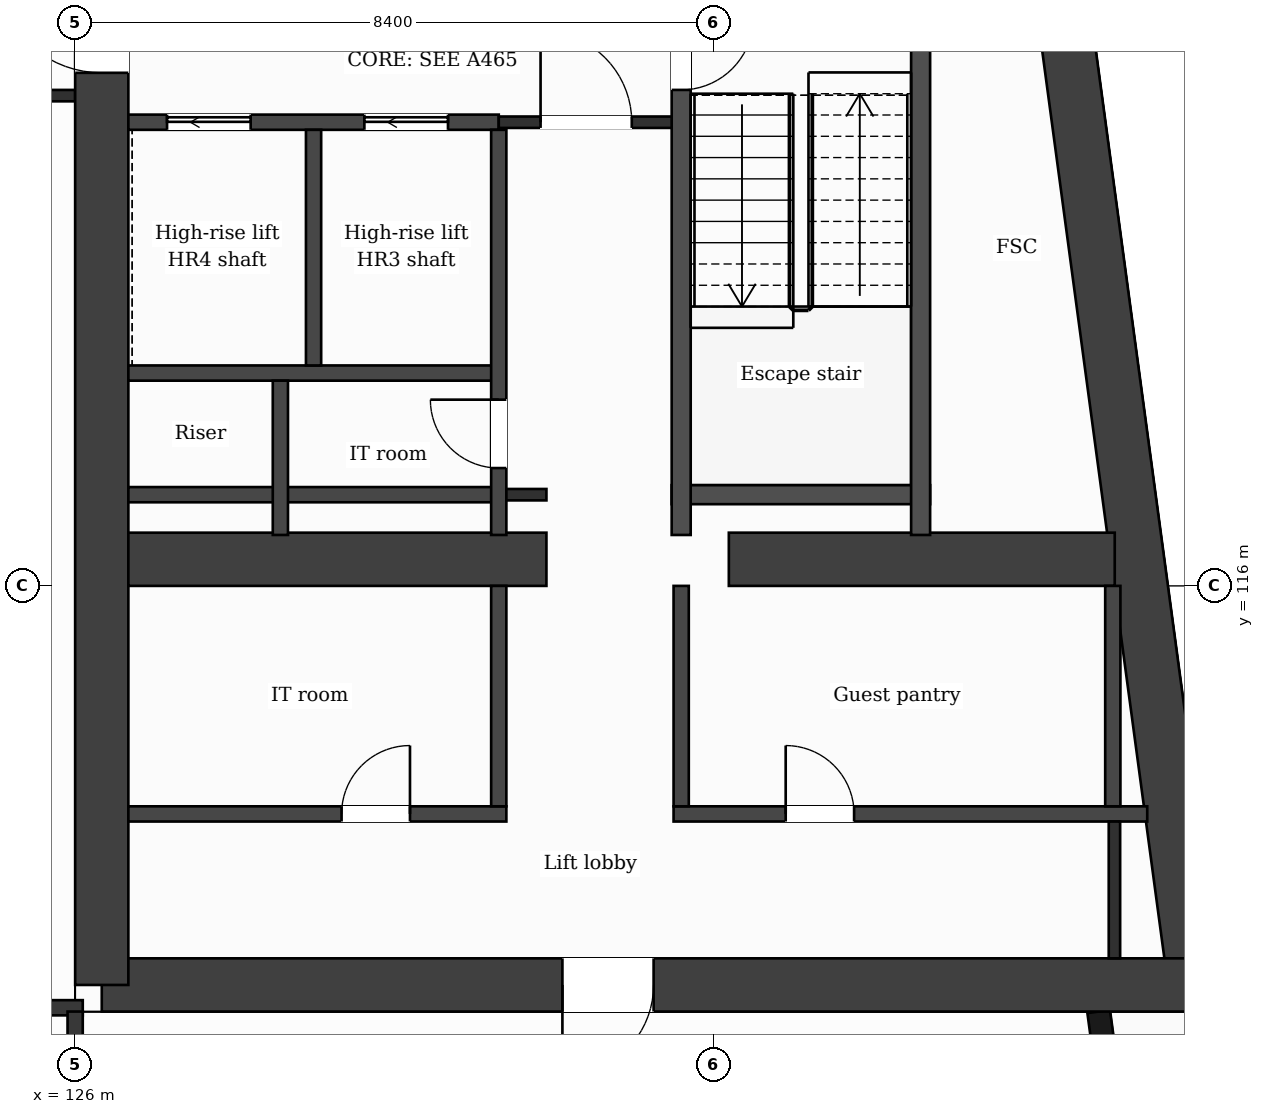
"""IFC4 building model, lengths in metres.
Left out: names, types, materials, properties, quantities, classifications, styles, units other than length and angle.
Written with IfcOpenShell. Run it as: python <this file> out.ifc"""

import sys

from ifc_helpers import new_model, si_unit, direction, frame, frame_2d, origin, place, context, subcontext, project, spatial, rectangle, extrude, element, fill, save


model = new_model("IFC4")
c1 = context("Model", 3, precision=1e-05, world=origin(), true_north=direction((0.0, 1.0)))
c2 = subcontext(c1, "Body", "Model", "MODEL_VIEW")
j1 = project(units=[si_unit("LENGTHUNIT", "METRE"), si_unit("PLANEANGLEUNIT", "RADIAN")], contexts=[c1])
p1 = place(None, origin())
s1 = spatial("IfcSite", under=j1, at=p1, CompositionType="ELEMENT")
p2 = place(p1, origin())
s2 = spatial("IfcBuilding", under=s1, at=p2, CompositionType="ELEMENT")
p3 = place(p2, frame((0.0, 0.0, 266.4)))
s3 = spatial("IfcBuildingStorey", under=s2, at=p3, CompositionType="ELEMENT", Elevation=266.4)
p4 = place(p3, frame((137.863, 132.05, 0.0), z_axis=(0.0, 0.0, 1.0), x_axis=(0.133406218907, -0.991061441464, 0.0)))
e1 = element("IfcWall", 1, at=p4, inside=s3, PredefinedType="SHEAR", context=c2, shape_type="SweptSolid", body=[
    extrude(rectangle(XDim=21.492, YDim=0.7, at=frame_2d((10.746, 0.0))), origin(), (0.0, 0.0, 1.0), 3.7),
])
p5 = place(p3, frame((140.73, 110.75, 0.0), z_axis=(0.0, 0.0, 1.0), x_axis=(-1.0, 0.0, 0.0)))
e2 = element("IfcWall", 2, at=p5, inside=s3, PredefinedType="SHEAR", context=c2, shape_type="SweptSolid", body=[
    extrude(rectangle(XDim=14.38, YDim=0.7, at=frame_2d((7.19, 0.0))), origin(), (0.0, 0.0, 1.0), 3.7),
])
p6 = place(p5, frame((7.12, 0.0, 0.0)))
e3 = element("IfcOpeningElement", 3, at=p6, cuts=e2, PredefinedType="OPENING", context=c2, shape_type="SweptSolid", body=[
    extrude(rectangle(XDim=1.2, YDim=2.1, at=frame_2d((0.6, 1.05))), frame((0.0, 0.36, 0.0), z_axis=(0.0, -1.0, 0.0), x_axis=(1.0, 0.0, 0.0)), (0.0, 0.0, 1.0), 0.72),
])
p7 = place(p3, frame((126.35, 110.75, 0.0), z_axis=(0.0, 0.0, 1.0), x_axis=(0.0, 1.0, 0.0)))
e4 = element("IfcWall", 4, at=p7, inside=s3, PredefinedType="SHEAR", context=c2, shape_type="SweptSolid", body=[
    extrude(rectangle(XDim=21.3, YDim=0.7, at=frame_2d((10.65, 0.0))), origin(), (0.0, 0.0, 1.0), 3.7),
])
p8 = place(p7, frame((12.0, 0.0, 0.0)))
e5 = element("IfcOpeningElement", 5, at=p8, cuts=e4, PredefinedType="OPENING", context=c2, shape_type="SweptSolid", body=[
    extrude(rectangle(XDim=1.4, YDim=2.1, at=frame_2d((0.7, 1.05))), frame((0.0, 0.36, 0.0), z_axis=(0.0, -1.0, 0.0), x_axis=(1.0, 0.0, 0.0)), (0.0, 0.0, 1.0), 0.72),
])
p9 = place(p3, frame((126.7, 116.35, 0.0), z_axis=(0.0, 0.0, 1.0), x_axis=(1.0, 0.0, 0.0)))
e6 = element("IfcWall", 6, at=p9, inside=s3, PredefinedType="SHEAR", context=c2, shape_type="SweptSolid", body=[
    extrude(rectangle(XDim=5.5, YDim=0.7, at=frame_2d((2.75, 0.0))), origin(), (0.0, 0.0, 1.0), 3.7),
])
p10 = place(p3, frame((134.6, 116.35, 0.0), z_axis=(0.0, 0.0, 1.0), x_axis=(1.0, 0.0, 0.0)))
e7 = element("IfcWall", 7, at=p10, inside=s3, PredefinedType="SHEAR", context=c2, shape_type="SweptSolid", body=[
    extrude(rectangle(XDim=5.077, YDim=0.7, at=frame_2d((2.539, 0.0))), origin(), (0.0, 0.0, 1.0), 3.7),
])
p11 = place(p3, frame((139.701, 108.65, 0.0), z_axis=(0.0, 0.0, 1.0), x_axis=(-0.133422458344, 0.991059255347, 0.0)))
e8 = element("IfcWall", 8, at=p11, inside=s3, PredefinedType="SOLIDWALL", context=c2, shape_type="SweptSolid", body=[
    extrude(rectangle(XDim=1.766, YDim=0.3, at=frame_2d((0.883, 0.0))), origin(), (0.0, 0.0, 1.0), 3.38),
])
p12 = place(p3, frame((100.7, 110.45, 0.0), z_axis=(0.0, 0.0, 1.0), x_axis=(1.0, 0.0, 0.0)))
e9 = element("IfcWall", 9, at=p12, inside=s3, PredefinedType="PARTITIONING", context=c2, shape_type="SweptSolid", body=[
    extrude(rectangle(XDim=25.4, YDim=0.2, at=frame_2d((12.7, 0.0))), origin(), (0.0, 0.0, 1.0), 3.38),
])
p13 = place(p3, frame((126.7, 113.0, 0.0), z_axis=(0.0, 0.0, 1.0), x_axis=(1.0, 0.0, 0.0)))
e10 = element("IfcWall", 10, at=p13, inside=s3, PredefinedType="PARTITIONING", context=c2, shape_type="SweptSolid", body=[
    extrude(rectangle(XDim=4.973, YDim=0.2, at=frame_2d((2.487, 0.0))), origin(), (0.0, 0.0, 1.0), 3.38),
])
p14 = place(p13, frame((2.805, 0.0, 0.0)))
e11 = element("IfcOpeningElement", 11, at=p14, cuts=e10, PredefinedType="OPENING", context=c2, shape_type="SweptSolid", body=[
    extrude(rectangle(XDim=0.9, YDim=2.1, at=frame_2d((0.45, 1.05))), frame((0.0, 0.11, 0.0), z_axis=(0.0, -1.0, 0.0), x_axis=(1.0, 0.0, 0.0)), (0.0, 0.0, 1.0), 0.22),
])
p15 = place(p3, frame((133.873, 113.0, 0.0), z_axis=(0.0, 0.0, 1.0), x_axis=(1.0, 0.0, 0.0)))
e12 = element("IfcWall", 12, at=p15, inside=s3, PredefinedType="PARTITIONING", context=c2, shape_type="SweptSolid", body=[
    extrude(rectangle(XDim=6.231, YDim=0.2, at=frame_2d((3.116, 0.0))), origin(), (0.0, 0.0, 1.0), 3.38),
])
p16 = place(p15, frame((1.475, 0.0, 0.0)))
e13 = element("IfcOpeningElement", 13, at=p16, cuts=e12, PredefinedType="OPENING", context=c2, shape_type="SweptSolid", body=[
    extrude(rectangle(XDim=0.9, YDim=2.1, at=frame_2d((0.45, 1.05))), frame((0.0, 0.11, 0.0), z_axis=(0.0, -1.0, 0.0), x_axis=(1.0, 0.0, 0.0)), (0.0, 0.0, 1.0), 0.22),
])
p17 = place(p3, frame((126.7, 117.2, 0.0), z_axis=(0.0, 0.0, 1.0), x_axis=(1.0, 0.0, 0.0)))
e14 = element("IfcWall", 14, at=p17, inside=s3, PredefinedType="PARTITIONING", context=c2, shape_type="SweptSolid", body=[
    extrude(rectangle(XDim=4.873, YDim=0.2, at=frame_2d((2.437, 0.0))), origin(), (0.0, 0.0, 1.0), 3.38),
])
p18 = place(p3, frame((131.573, 117.2, 0.0), z_axis=(0.0, 0.0, 1.0), x_axis=(1.0, 0.0, 0.0)))
e15 = element("IfcWall", 15, at=p18, inside=s3, PredefinedType="PARTITIONING", context=c2, shape_type="SweptSolid", body=[
    extrude(rectangle(XDim=0.627, YDim=0.15, at=frame_2d((0.313, 0.0))), origin(), (0.0, 0.0, 1.0), 3.38),
])
p19 = place(p3, frame((133.848, 117.2, 0.0), z_axis=(0.0, 0.0, 1.0), x_axis=(1.0, 0.0, 0.0)))
e16 = element("IfcWall", 16, at=p19, inside=s3, PredefinedType="PARTITIONING", context=c2, shape_type="SweptSolid", body=[
    extrude(rectangle(XDim=3.4, YDim=0.25, at=frame_2d((1.7, 0.0))), origin(), (0.0, 0.0, 1.0), 3.38),
])
p20 = place(p3, frame((126.7, 118.8, 0.0), z_axis=(0.0, 0.0, 1.0), x_axis=(1.0, 0.0, 0.0)))
e17 = element("IfcWall", 17, at=p20, inside=s3, PredefinedType="PARTITIONING", context=c2, shape_type="SweptSolid", body=[
    extrude(rectangle(XDim=4.873, YDim=0.2, at=frame_2d((2.437, 0.0))), origin(), (0.0, 0.0, 1.0), 3.38),
])
p21 = place(p3, frame((126.7, 122.1, 0.0), z_axis=(0.0, 0.0, 1.0), x_axis=(1.0, 0.0, 0.0)))
e18 = element("IfcWall", 18, at=p21, inside=s3, PredefinedType="PARTITIONING", context=c2, shape_type="SweptSolid", body=[
    extrude(rectangle(XDim=4.873, YDim=0.2, at=frame_2d((2.437, 0.0))), origin(), (0.0, 0.0, 1.0), 3.38),
])
p22 = place(p21, frame((3.105, 0.0, 0.0)))
e19 = element("IfcOpeningElement", 19, at=p22, cuts=e18, PredefinedType="OPENING", context=c2, shape_type="SweptSolid", body=[
    extrude(rectangle(XDim=1.1, YDim=2.1, at=frame_2d((0.55, 1.05))), frame((0.0, 0.11, 0.0), z_axis=(0.0, -1.0, 0.0), x_axis=(1.0, 0.0, 0.0)), (0.0, 0.0, 1.0), 0.22),
])
p23 = place(p21, frame((0.509, 0.0, 0.0)))
e20 = element("IfcOpeningElement", 20, at=p23, cuts=e18, PredefinedType="OPENING", context=c2, shape_type="SweptSolid", body=[
    extrude(rectangle(XDim=1.1, YDim=2.1, at=frame_2d((0.55, 1.05))), frame((0.0, 0.11, 0.0), z_axis=(0.0, -1.0, 0.0), x_axis=(1.0, 0.0, 0.0)), (0.0, 0.0, 1.0), 0.22),
])
p24 = place(p3, frame((131.573, 122.1, 0.0), z_axis=(0.0, 0.0, 1.0), x_axis=(1.0, 0.0, 0.0)))
e21 = element("IfcWall", 21, at=p24, inside=s3, PredefinedType="PARTITIONING", context=c2, shape_type="SweptSolid", body=[
    extrude(rectangle(XDim=2.4, YDim=0.15, at=frame_2d((1.2, 0.0))), origin(), (0.0, 0.0, 1.0), 3.38),
])
p25 = place(p24, frame((0.55, 0.0, 0.0)))
e22 = element("IfcOpeningElement", 22, at=p25, cuts=e21, PredefinedType="OPENING", context=c2, shape_type="SweptSolid", body=[
    extrude(rectangle(XDim=1.2, YDim=2.1, at=frame_2d((0.6, 1.05))), frame((0.0, 0.085, 0.0), z_axis=(0.0, -1.0, 0.0), x_axis=(1.0, 0.0, 0.0)), (0.0, 0.0, 1.0), 0.17),
])
p26 = place(p3, frame((100.8, 122.45, 0.0), z_axis=(0.0, 0.0, 1.0), x_axis=(1.0, 0.0, 0.0)))
e23 = element("IfcWall", 23, at=p26, inside=s3, PredefinedType="PARTITIONING", context=c2, shape_type="SweptSolid", body=[
    extrude(rectangle(XDim=25.2, YDim=0.15, at=frame_2d((12.6, 0.0))), origin(), (0.0, 0.0, 1.0), 3.38),
])
p27 = place(p26, frame((5.55, 0.0, 0.0)))
e24 = element("IfcOpeningElement", 24, at=p27, cuts=e23, PredefinedType="OPENING", context=c2, shape_type="SweptSolid", body=[
    extrude(rectangle(XDim=1.0, YDim=2.1, at=frame_2d((0.5, 1.05))), frame((0.0, 0.085, 0.0), z_axis=(0.0, -1.0, 0.0), x_axis=(1.0, 0.0, 0.0)), (0.0, 0.0, 1.0), 0.17),
])
p28 = place(p26, frame((8.65, 0.0, 0.0)))
e25 = element("IfcOpeningElement", 25, at=p28, cuts=e23, PredefinedType="OPENING", context=c2, shape_type="SweptSolid", body=[
    extrude(rectangle(XDim=1.0, YDim=2.1, at=frame_2d((0.5, 1.05))), frame((0.0, 0.085, 0.0), z_axis=(0.0, -1.0, 0.0), x_axis=(1.0, 0.0, 0.0)), (0.0, 0.0, 1.0), 0.17),
])
p29 = place(p26, frame((19.83, 0.0, 0.0)))
e26 = element("IfcOpeningElement", 26, at=p29, cuts=e23, PredefinedType="OPENING", context=c2, shape_type="SweptSolid", body=[
    extrude(rectangle(XDim=1.0, YDim=2.1, at=frame_2d((0.5, 1.05))), frame((0.0, 0.085, 0.0), z_axis=(0.0, -1.0, 0.0), x_axis=(1.0, 0.0, 0.0)), (0.0, 0.0, 1.0), 0.17),
])
p30 = place(p3, frame((126.0, 108.79, 0.0), z_axis=(0.0, 0.0, 1.0), x_axis=(0.0, 1.0, 0.0)))
e27 = element("IfcWall", 27, at=p30, inside=s3, PredefinedType="PARTITIONING", context=c2, shape_type="SweptSolid", body=[
    extrude(rectangle(XDim=1.61, YDim=0.2, at=frame_2d((0.805, 0.0))), origin(), (0.0, 0.0, 1.0), 3.38),
])
p31 = place(p3, frame((128.7, 116.67, 0.0), z_axis=(0.0, 0.0, 1.0), x_axis=(0.0, 1.0, 0.0)))
e28 = element("IfcWall", 28, at=p31, inside=s3, PredefinedType="PARTITIONING", context=c2, shape_type="SweptSolid", body=[
    extrude(rectangle(XDim=2.03, YDim=0.2, at=frame_2d((1.015, 0.0))), origin(), (0.0, 0.0, 1.0), 3.38),
])
p32 = place(p3, frame((129.136, 118.9, 0.0), z_axis=(0.0, 0.0, 1.0), x_axis=(0.0, 1.0, 0.0)))
e29 = element("IfcWall", 29, at=p32, inside=s3, PredefinedType="PARTITIONING", context=c2, shape_type="SweptSolid", body=[
    extrude(rectangle(XDim=3.1, YDim=0.2, at=frame_2d((1.55, 0.0))), origin(), (0.0, 0.0, 1.0), 3.38),
])
p33 = place(p3, frame((131.573, 113.1, 0.0), z_axis=(0.0, 0.0, 1.0), x_axis=(0.0, 1.0, 0.0)))
e30 = element("IfcWall", 30, at=p33, inside=s3, PredefinedType="PARTITIONING", context=c2, shape_type="SweptSolid", body=[
    extrude(rectangle(XDim=2.9, YDim=0.2, at=frame_2d((1.45, 0.0))), origin(), (0.0, 0.0, 1.0), 3.38),
])
p34 = place(p3, frame((131.573, 116.67, 0.0), z_axis=(0.0, 0.0, 1.0), x_axis=(0.0, 1.0, 0.0)))
e31 = element("IfcWall", 31, at=p34, inside=s3, PredefinedType="PARTITIONING", context=c2, shape_type="SweptSolid", body=[
    extrude(rectangle(XDim=5.33, YDim=0.2, at=frame_2d((2.665, 0.0))), origin(), (0.0, 0.0, 1.0), 3.38),
])
p35 = place(p34, frame((0.88, 0.0, 0.0)))
e32 = element("IfcOpeningElement", 32, at=p35, cuts=e31, PredefinedType="OPENING", context=c2, shape_type="SweptSolid", body=[
    extrude(rectangle(XDim=0.9, YDim=2.1, at=frame_2d((0.45, 1.05))), frame((0.0, 0.11, 0.0), z_axis=(0.0, -1.0, 0.0), x_axis=(1.0, 0.0, 0.0)), (0.0, 0.0, 1.0), 0.22),
])
p36 = place(p3, frame((133.973, 113.1, 0.0), z_axis=(0.0, 0.0, 1.0), x_axis=(0.0, 1.0, 0.0)))
e33 = element("IfcWall", 33, at=p36, inside=s3, PredefinedType="PARTITIONING", context=c2, shape_type="SweptSolid", body=[
    extrude(rectangle(XDim=2.9, YDim=0.2, at=frame_2d((1.45, 0.0))), origin(), (0.0, 0.0, 1.0), 3.38),
])
p37 = place(p3, frame((133.973, 116.67, 0.0), z_axis=(0.0, 0.0, 1.0), x_axis=(0.0, 1.0, 0.0)))
e34 = element("IfcWall", 34, at=p37, inside=s3, PredefinedType="PARTITIONING", context=c2, shape_type="SweptSolid", body=[
    extrude(rectangle(XDim=7.155, YDim=0.25, at=frame_2d((3.578, 0.0))), origin(), (0.0, 0.0, 1.0), 3.38),
])
p38 = place(p37, frame((5.855, 0.0, 0.0)))
e35 = element("IfcOpeningElement", 35, at=p38, cuts=e34, PredefinedType="OPENING", context=c2, shape_type="SweptSolid", body=[
    extrude(rectangle(XDim=0.95, YDim=2.1, at=frame_2d((0.475, 1.05))), frame((0.0, 0.135, 0.0), z_axis=(0.0, -1.0, 0.0), x_axis=(1.0, 0.0, 0.0)), (0.0, 0.0, 1.0), 0.27),
])
p39 = place(p3, frame((137.123, 116.67, 0.0), z_axis=(0.0, 0.0, 1.0), x_axis=(0.0, 1.0, 0.0)))
e36 = element("IfcWall", 36, at=p39, inside=s3, PredefinedType="PARTITIONING", context=c2, shape_type="SweptSolid", body=[
    extrude(rectangle(XDim=7.155, YDim=0.25, at=frame_2d((3.578, 0.0))), origin(), (0.0, 0.0, 1.0), 3.38),
])
p40 = place(p3, frame((139.652, 113.1, 0.0), z_axis=(0.0, 0.0, 1.0), x_axis=(0.0, 1.0, 0.0)))
e37 = element("IfcWall", 37, at=p40, inside=s3, PredefinedType="PARTITIONING", context=c2, shape_type="SweptSolid", body=[
    extrude(rectangle(XDim=2.9, YDim=0.2, at=frame_2d((1.45, 0.0))), origin(), (0.0, 0.0, 1.0), 3.38),
])
p41 = place(p3, frame((139.673, 111.1, 0.0), z_axis=(0.0, 0.0, 1.0), x_axis=(0.0, 1.0, 0.0)))
e38 = element("IfcWall", 38, at=p41, inside=s3, PredefinedType="PARTITIONING", context=c2, shape_type="SweptSolid", body=[
    extrude(rectangle(XDim=1.8, YDim=0.15, at=frame_2d((0.9, 0.0))), origin(), (0.0, 0.0, 1.0), 3.38),
])
p42 = place(p25, origin())
e39 = element("IfcDoor", 39, at=p42, inside=s3, OperationType="SINGLE_SWING_LEFT", PredefinedType="DOOR", context=c2, shape_type="SweptSolid", body=[
    extrude(rectangle(XDim=1.2, YDim=2.1, at=frame_2d((0.6, 1.05))), frame((0.0, 0.025, 0.0), z_axis=(0.0, -1.0, 0.0), x_axis=(1.0, 0.0, 0.0)), (0.0, 0.0, 1.0), 0.05),
])
fill(e22, e39)
p43 = place(p22, origin())
e40 = element("IfcDoor", 40, at=p43, inside=s3, OperationType="SLIDING_TO_LEFT", PredefinedType="DOOR", context=c2, shape_type="SweptSolid", body=[
    extrude(rectangle(XDim=1.1, YDim=2.1, at=frame_2d((0.55, 1.05))), frame((0.0, 0.025, 0.0), z_axis=(0.0, -1.0, 0.0), x_axis=(1.0, 0.0, 0.0)), (0.0, 0.0, 1.0), 0.05),
])
fill(e19, e40)
p44 = place(p23, origin())
e41 = element("IfcDoor", 41, at=p44, inside=s3, OperationType="SLIDING_TO_LEFT", PredefinedType="DOOR", context=c2, shape_type="SweptSolid", body=[
    extrude(rectangle(XDim=1.1, YDim=2.1, at=frame_2d((0.55, 1.05))), frame((0.0, 0.025, 0.0), z_axis=(0.0, -1.0, 0.0), x_axis=(1.0, 0.0, 0.0)), (0.0, 0.0, 1.0), 0.05),
])
fill(e20, e41)
p45 = place(p38, origin())
e42 = element("IfcDoor", 42, at=p45, inside=s3, OperationType="SINGLE_SWING_RIGHT", PredefinedType="DOOR", context=c2, shape_type="SweptSolid", body=[
    extrude(rectangle(XDim=0.95, YDim=2.1, at=frame_2d((0.475, 1.05))), frame((0.0, 0.025, 0.0), z_axis=(0.0, -1.0, 0.0), x_axis=(1.0, 0.0, 0.0)), (0.0, 0.0, 1.0), 0.05),
])
fill(e35, e42)
p46 = place(p35, origin())
e43 = element("IfcDoor", 43, at=p46, inside=s3, OperationType="SINGLE_SWING_RIGHT", PredefinedType="DOOR", context=c2, shape_type="SweptSolid", body=[
    extrude(rectangle(XDim=0.9, YDim=2.1, at=frame_2d((0.45, 1.05))), frame((0.0, 0.025, 0.0), z_axis=(0.0, -1.0, 0.0), x_axis=(1.0, 0.0, 0.0)), (0.0, 0.0, 1.0), 0.05),
])
fill(e32, e43)
p47 = place(p16, origin())
e44 = element("IfcDoor", 44, at=p47, inside=s3, OperationType="SINGLE_SWING_LEFT", PredefinedType="DOOR", context=c2, shape_type="SweptSolid", body=[
    extrude(rectangle(XDim=0.9, YDim=2.1, at=frame_2d((0.45, 1.05))), frame((0.0, 0.025, 0.0), z_axis=(0.0, -1.0, 0.0), x_axis=(1.0, 0.0, 0.0)), (0.0, 0.0, 1.0), 0.05),
])
fill(e13, e44)
p48 = place(p14, origin())
e45 = element("IfcDoor", 45, at=p48, inside=s3, OperationType="SINGLE_SWING_RIGHT", PredefinedType="DOOR", context=c2, shape_type="SweptSolid", body=[
    extrude(rectangle(XDim=0.9, YDim=2.1, at=frame_2d((0.45, 1.05))), frame((0.0, 0.025, 0.0), z_axis=(0.0, -1.0, 0.0), x_axis=(1.0, 0.0, 0.0)), (0.0, 0.0, 1.0), 0.05),
])
fill(e11, e45)
p49 = place(p6, origin())
e46 = element("IfcDoor", 46, at=p49, inside=s3, OperationType="SINGLE_SWING_RIGHT", PredefinedType="DOOR", context=c2, shape_type="SweptSolid", body=[
    extrude(rectangle(XDim=1.2, YDim=2.1, at=frame_2d((0.6, 1.05))), frame((0.0, 0.025, 0.0), z_axis=(0.0, -1.0, 0.0), x_axis=(1.0, 0.0, 0.0)), (0.0, 0.0, 1.0), 0.05),
])
fill(e3, e46)
p50 = place(p8, origin())
e47 = element("IfcDoor", 47, at=p50, inside=s3, OperationType="SINGLE_SWING_RIGHT", PredefinedType="DOOR", context=c2, shape_type="SweptSolid", body=[
    extrude(rectangle(XDim=1.4, YDim=2.1, at=frame_2d((0.7, 1.05))), frame((0.0, 0.025, 0.0), z_axis=(0.0, -1.0, 0.0), x_axis=(1.0, 0.0, 0.0)), (0.0, 0.0, 1.0), 0.05),
])
fill(e5, e47)
save(model, sys.argv[1])
